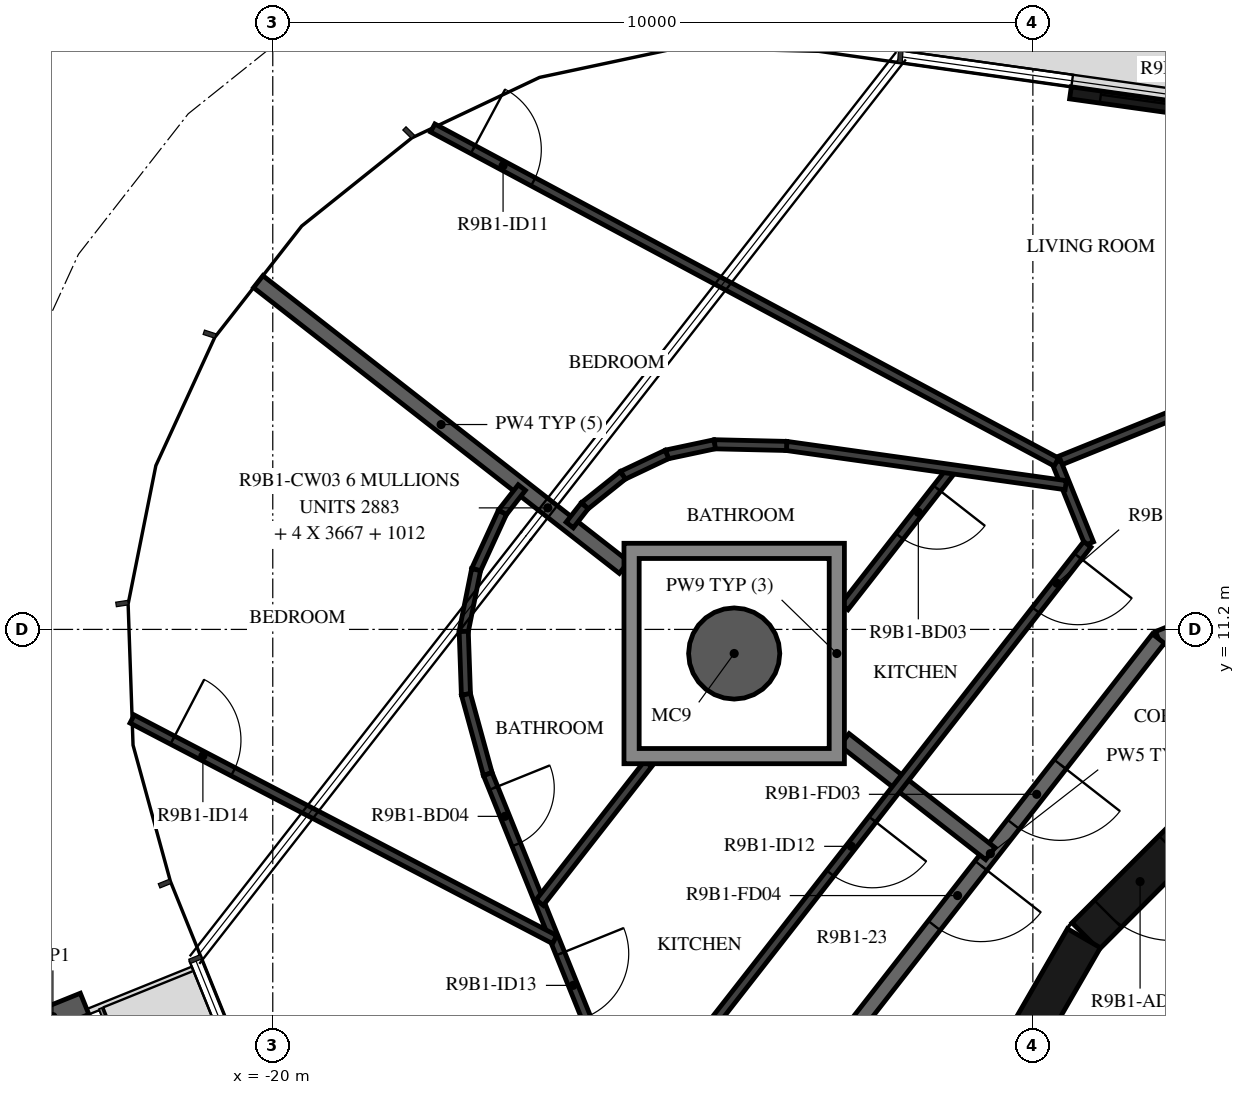
"""IFC4 building model, lengths in metres.
Left out: names, types, materials, properties, quantities, classifications, styles, units other than length and angle.
Written with IfcOpenShell. Run it as: python <this file> out.ifc"""

import sys

from ifc_helpers import new_model, si_unit, direction, frame, frame_2d, origin, origin_2d, place, context, subcontext, project, spatial, polyline, rectangle, hollow_circle, i_section, outline, extrude, element, fill, save


model = new_model("IFC4")
c1 = context("Model", 3, precision=1e-05, world=origin(), true_north=direction((0.0, 1.0)))
c2 = subcontext(c1, "Body", "Model", "MODEL_VIEW")
j1 = project(units=[si_unit("LENGTHUNIT", "METRE"), si_unit("PLANEANGLEUNIT", "RADIAN")], contexts=[c1])
p1 = place(None, origin())
s1 = spatial("IfcSite", under=j1, at=p1, CompositionType="ELEMENT")
p2 = place(p1, origin())
s2 = spatial("IfcBuilding", under=s1, at=p2, CompositionType="ELEMENT")
p3 = place(p2, frame((0.0, 0.0, 343.5)))
s3 = spatial("IfcBuildingStorey", under=s2, at=p3, CompositionType="ELEMENT", Elevation=343.5)
p4 = place(p3, frame((-13.929, 10.883, -0.38), z_axis=(0.0, 0.0, 1.0), x_axis=(1.0, 0.0, 0.0)))
e1 = element("IfcColumn", 1, at=p4, inside=s3, PredefinedType="COLUMN", context=c2, shape_type="SweptSolid", body=[
    extrude(hollow_circle(Radius=0.6, WallThickness=0.03, at=origin_2d()), origin(), (0.0, 0.0, 1.0), 3.5),
])
p5 = place(p3, frame((-22.893, 6.106, -0.38), z_axis=(0.0, 0.0, 1.0), x_axis=(-0.374606892434, 0.927183733755, 0.0)))
e2 = element("IfcColumn", 2, at=p5, inside=s3, PredefinedType="COLUMN", context=c2, shape_type="SweptSolid", body=[
    extrude(i_section(OverallWidth=0.3, OverallDepth=0.9, WebThickness=0.019, FlangeThickness=0.035, FilletRadius=0.03, at=origin_2d()), origin(), (0.0, 0.0, 1.0), 3.5),
])
p6 = place(p3, frame((-6.337, 17.814, 0.0), z_axis=(0.0, 0.0, 1.0), x_axis=(-0.99026890462, 0.13916715325, 0.0)))
e3 = element("IfcWall", 3, at=p6, inside=s3, PredefinedType="STANDARD", context=c2, shape_type="SweptSolid", body=[
    extrude(rectangle(XDim=3.2, YDim=0.16, at=frame_2d((1.6, 0.0))), origin(), (0.0, 0.0, 1.0), 3.12),
])
p7 = place(p6, frame((0.4, 0.0, 0.0)))
e4 = element("IfcOpeningElement", 4, at=p7, cuts=e3, PredefinedType="OPENING", context=c2, shape_type="SweptSolid", body=[
    extrude(rectangle(XDim=2.4, YDim=2.4, at=frame_2d((1.2, 1.2))), frame((0.0, 0.09, 0.0), z_axis=(0.0, -1.0, 0.0), x_axis=(1.0, 0.0, 0.0)), (0.0, 0.0, 1.0), 0.18),
])
p8 = place(p3, frame((-7.164, 9.308, 0.0), z_axis=(0.0, 0.0, 1.0), x_axis=(-0.707106781187, -0.707106781187, 0.0)))
e5 = element("IfcWall", 5, at=p8, inside=s3, PredefinedType="SHEAR", context=c2, shape_type="SweptSolid", body=[
    extrude(rectangle(XDim=3.032, YDim=0.5, at=frame_2d((1.516, 0.0))), origin(), (0.0, 0.0, 1.0), 3.12),
])
p9 = place(p8, frame((1.416, 0.0, 0.0)))
e6 = element("IfcOpeningElement", 6, at=p9, cuts=e5, PredefinedType="OPENING", context=c2, shape_type="SweptSolid", body=[
    extrude(rectangle(XDim=1.2, YDim=2.1, at=frame_2d((0.6, 1.05))), frame((0.0, 0.26, 0.0), z_axis=(0.0, -1.0, 0.0), x_axis=(1.0, 0.0, 0.0)), (0.0, 0.0, 1.0), 0.52),
])
p10 = place(p3, frame((-9.329, 7.137, 0.0), z_axis=(0.0, 0.0, 1.0), x_axis=(-0.500087131594, -0.865975092491, 0.0)))
e7 = element("IfcWall", 7, at=p10, inside=s3, PredefinedType="SHEAR", context=c2, shape_type="SweptSolid", body=[
    extrude(rectangle(XDim=3.033, YDim=0.5, at=frame_2d((1.516, 0.0))), origin(), (0.0, 0.0, 1.0), 3.12),
])
p11 = place(p3, frame((-1.691, 13.769, 0.0), z_axis=(0.0, 0.0, 1.0), x_axis=(-0.92717916932, -0.374618189599, 0.0)))
e8 = element("IfcWall", 8, at=p11, inside=s3, PredefinedType="STANDARD", context=c2, shape_type="SweptSolid", body=[
    extrude(rectangle(XDim=7.181, YDim=0.2, at=frame_2d((3.591, 0.0))), origin(), (0.0, 0.0, 1.0), 3.12),
])
p12 = place(p3, frame((-8.349, 11.079, 0.0), z_axis=(0.0, 0.0, 1.0), x_axis=(-0.615669112324, -0.78800478687, 0.0)))
e9 = element("IfcWall", 9, at=p12, inside=s3, PredefinedType="STANDARD", context=c2, shape_type="SweptSolid", body=[
    extrude(rectangle(XDim=7.181, YDim=0.2, at=frame_2d((3.591, 0.0))), origin(), (0.0, 0.0, 1.0), 3.12),
])
p13 = place(p12, frame((2.1, 0.0, 0.0)))
e10 = element("IfcOpeningElement", 10, at=p13, cuts=e9, PredefinedType="OPENING", context=c2, shape_type="SweptSolid", body=[
    extrude(rectangle(XDim=1.0, YDim=2.1, at=frame_2d((0.5, 1.05))), frame((0.0, 0.11, 0.0), z_axis=(0.0, -1.0, 0.0), x_axis=(1.0, 0.0, 0.0)), (0.0, 0.0, 1.0), 0.22),
])
p14 = place(p12, frame((3.79, 0.0, 0.0)))
e11 = element("IfcOpeningElement", 11, at=p14, cuts=e9, PredefinedType="OPENING", context=c2, shape_type="SweptSolid", body=[
    extrude(rectangle(XDim=1.0, YDim=2.1, at=frame_2d((0.5, 1.05))), frame((0.0, 0.11, 0.0), z_axis=(0.0, -1.0, 0.0), x_axis=(1.0, 0.0, 0.0)), (0.0, 0.0, 1.0), 0.22),
])
p15 = place(p3, frame((-12.479, 9.75, 0.0), z_axis=(0.0, 0.0, 1.0), x_axis=(0.788050197026, -0.615610986717, 0.0)))
e12 = element("IfcWall", 12, at=p15, inside=s3, PredefinedType="STANDARD", context=c2, shape_type="SweptSolid", body=[
    extrude(rectangle(XDim=2.437, YDim=0.2, at=frame_2d((1.218, 0.0))), origin(), (0.0, 0.0, 1.0), 3.12),
])
p16 = place(p3, frame((-20.191, 15.775, 0.0), z_axis=(0.0, 0.0, 1.0), x_axis=(0.788021948923, -0.615647145706, 0.0)))
e13 = element("IfcWall", 13, at=p16, inside=s3, PredefinedType="STANDARD", context=c2, shape_type="SweptSolid", body=[
    extrude(rectangle(XDim=6.106, YDim=0.2, at=frame_2d((3.053, 0.0))), origin(), (0.0, 0.0, 1.0), 3.12),
])
p17 = place(p3, frame((-8.115, 14.039, 0.0), z_axis=(0.0, 0.0, 1.0), x_axis=(-0.927153589835, -0.374681492546, 0.0)))
e14 = element("IfcWall", 14, at=p17, inside=s3, PredefinedType="PARTITIONING", context=c2, shape_type="SweptSolid", body=[
    extrude(rectangle(XDim=1.7, YDim=0.12, at=frame_2d((0.85, 0.0))), origin(), (0.0, 0.0, 1.0), 3.12),
])
p18 = place(p3, frame((-9.691, 13.402, 0.0), z_axis=(0.0, 0.0, 1.0), x_axis=(0.374484003097, -0.927233374844, 0.0)))
e15 = element("IfcWall", 15, at=p18, inside=s3, PredefinedType="PARTITIONING", context=c2, shape_type="SweptSolid", body=[
    extrude(rectangle(XDim=1.156, YDim=0.12, at=frame_2d((0.578, 0.0))), origin(), (0.0, 0.0, 1.0), 3.12),
])
p19 = place(p3, frame((-9.283, 12.319, 0.0), z_axis=(0.0, 0.0, 1.0), x_axis=(-0.61567489546, -0.788000268464, 0.0)))
e16 = element("IfcWall", 16, at=p19, inside=s3, PredefinedType="PARTITIONING", context=c2, shape_type="SweptSolid", body=[
    extrude(rectangle(XDim=7.985, YDim=0.12, at=frame_2d((3.992, 0.0))), origin(), (0.0, 0.0, 1.0), 3.12),
])
p20 = place(p19, frame((0.2, 0.0, 0.0)))
e17 = element("IfcOpeningElement", 17, at=p20, cuts=e16, PredefinedType="OPENING", context=c2, shape_type="SweptSolid", body=[
    extrude(rectangle(XDim=0.9, YDim=2.1, at=frame_2d((0.45, 1.05))), frame((0.0, 0.07, 0.0), z_axis=(0.0, -1.0, 0.0), x_axis=(1.0, 0.0, 0.0)), (0.0, 0.0, 1.0), 0.14),
])
p21 = place(p19, frame((4.592, 0.0, 0.0)))
e18 = element("IfcOpeningElement", 18, at=p21, cuts=e16, PredefinedType="OPENING", context=c2, shape_type="SweptSolid", body=[
    extrude(rectangle(XDim=0.9, YDim=2.1, at=frame_2d((0.45, 1.05))), frame((0.0, 0.07, 0.0), z_axis=(0.0, -1.0, 0.0), x_axis=(1.0, 0.0, 0.0)), (0.0, 0.0, 1.0), 0.14),
])
p22 = place(p3, frame((-17.896, 17.797, 0.0), z_axis=(0.0, 0.0, 1.0), x_axis=(0.88150492406, -0.4721748287, 0.0)))
e19 = element("IfcWall", 19, at=p22, inside=s3, PredefinedType="PARTITIONING", context=c2, shape_type="SweptSolid", body=[
    extrude(rectangle(XDim=9.308, YDim=0.12, at=frame_2d((4.654, 0.0))), origin(), (0.0, 0.0, 1.0), 3.12),
])
p23 = place(p22, frame((0.6, 0.0, 0.0)))
e20 = element("IfcOpeningElement", 20, at=p23, cuts=e19, PredefinedType="OPENING", context=c2, shape_type="SweptSolid", body=[
    extrude(rectangle(XDim=0.9, YDim=2.1, at=frame_2d((0.45, 1.05))), frame((0.0, 0.07, 0.0), z_axis=(0.0, -1.0, 0.0), x_axis=(1.0, 0.0, 0.0)), (0.0, 0.0, 1.0), 0.14),
])
p24 = place(p3, frame((-11.064, 13.308, 0.0), z_axis=(0.0, 0.0, 1.0), x_axis=(-0.615681126827, -0.787995399777, 0.0)))
e21 = element("IfcWall", 21, at=p24, inside=s3, PredefinedType="PARTITIONING", context=c2, shape_type="SweptSolid", body=[
    extrude(rectangle(XDim=2.3, YDim=0.12, at=frame_2d((1.15, 0.0))), origin(), (0.0, 0.0, 1.0), 3.12),
])
p25 = place(p24, frame((0.32, 0.0, 0.0)))
e22 = element("IfcOpeningElement", 22, at=p25, cuts=e21, PredefinedType="OPENING", context=c2, shape_type="SweptSolid", body=[
    extrude(rectangle(XDim=0.8, YDim=2.1, at=frame_2d((0.4, 1.05))), frame((0.0, 0.07, 0.0), z_axis=(0.0, -1.0, 0.0), x_axis=(1.0, 0.0, 0.0)), (0.0, 0.0, 1.0), 0.14),
])
p26 = place(p3, frame((-9.568, 13.097, 0.0), z_axis=(0.0, 0.0, 1.0), x_axis=(-0.990266931728, 0.13918119099, 0.0)))
e23 = element("IfcWall", 23, at=p26, inside=s3, PredefinedType="PARTITIONING", context=c2, shape_type="SweptSolid", body=[
    extrude(rectangle(XDim=3.708, YDim=0.12, at=frame_2d((1.854, 0.0))), origin(), (0.0, 0.0, 1.0), 3.12),
])
p27 = place(p3, frame((-13.24, 13.614, 0.0), z_axis=(0.0, 0.0, 1.0), x_axis=(-0.999730529074, 0.023213557177, 0.0)))
e24 = element("IfcWall", 24, at=p27, inside=s3, PredefinedType="PARTITIONING", context=c2, shape_type="SweptSolid", body=[
    extrude(rectangle(XDim=0.947, YDim=0.12, at=frame_2d((0.473, 0.0))), origin(), (0.0, 0.0, 1.0), 3.12),
])
p28 = place(p3, frame((-14.186, 13.635, 0.0), z_axis=(0.0, 0.0, 1.0), x_axis=(-0.978217752025, -0.207581380725, 0.0)))
e25 = element("IfcWall", 25, at=p28, inside=s3, PredefinedType="PARTITIONING", context=c2, shape_type="SweptSolid", body=[
    extrude(rectangle(XDim=0.642, YDim=0.12, at=frame_2d((0.321, 0.0))), origin(), (0.0, 0.0, 1.0), 3.12),
])
for number, where, z_axis, x_axis in (
    (26, (-14.814, 13.502, 0.0), (0.0, 0.0, 1.0), (-0.904, -0.428, 0.0)),
    (27, (-15.395, 13.227, 0.0), (0.0, 0.0, 1.0), (-0.781, -0.625, 0.0)),
):
    element("IfcWall", number, at=place(p3, frame(where, z_axis=z_axis, x_axis=x_axis)), inside=s3, PredefinedType="PARTITIONING", context=c2, shape_type="SweptSolid", body=[
        extrude(rectangle(XDim=0.642, YDim=0.12, at=frame_2d((0.321, 0.0))), origin(), (0.0, 0.0, 1.0), 3.12),
    ])
p29 = place(p3, frame((-15.896, 12.826, 0.0), z_axis=(0.0, 0.0, 1.0), x_axis=(-0.615466865985, -0.788162760396, 0.0)))
e28 = element("IfcWall", 28, at=p29, inside=s3, PredefinedType="PARTITIONING", context=c2, shape_type="SweptSolid", body=[
    extrude(rectangle(XDim=0.321, YDim=0.12, at=frame_2d((0.16, 0.0))), origin(), (0.0, 0.0, 1.0), 3.12),
])
p30 = place(p3, frame((-16.724, 13.066, 0.0), z_axis=(0.0, 0.0, 1.0), x_axis=(-0.615895388651, -0.787827944565, 0.0)))
e29 = element("IfcWall", 29, at=p30, inside=s3, PredefinedType="PARTITIONING", context=c2, shape_type="SweptSolid", body=[
    extrude(rectangle(XDim=0.415, YDim=0.12, at=frame_2d((0.207, 0.0))), origin(), (0.0, 0.0, 1.0), 3.12),
])
for number, where, z_axis, x_axis in (
    (30, (-16.979, 12.74, 0.0), (0.0, 0.0, 1.0), (-0.417, -0.909, 0.0)),
    (31, (-17.325, 11.986, 0.0), (0.0, 0.0, 1.0), (-0.197, -0.98, 0.0)),
    (32, (-17.488, 11.173, 0.0), (0.0, 0.0, 1.0), (0.035, -0.999, 0.0)),
):
    element("IfcWall", number, at=place(p3, frame(where, z_axis=z_axis, x_axis=x_axis)), inside=s3, PredefinedType="PARTITIONING", context=c2, shape_type="SweptSolid", body=[
        extrude(rectangle(XDim=0.829, YDim=0.12, at=frame_2d((0.415, 0.0))), origin(), (0.0, 0.0, 1.0), 3.12),
    ])
p31 = place(p3, frame((-17.459, 10.345, 0.0), z_axis=(0.0, 0.0, 1.0), x_axis=(0.264409755069, -0.964410432038, 0.0)))
e33 = element("IfcWall", 33, at=p31, inside=s3, PredefinedType="PARTITIONING", context=c2, shape_type="SweptSolid", body=[
    extrude(rectangle(XDim=1.087, YDim=0.12, at=frame_2d((0.543, 0.0))), origin(), (0.0, 0.0, 1.0), 3.12),
])
p32 = place(p3, frame((-17.171, 9.297, 0.0), z_axis=(0.0, 0.0, 1.0), x_axis=(0.374594127493, -0.927188891029, 0.0)))
e34 = element("IfcWall", 34, at=p32, inside=s3, PredefinedType="PARTITIONING", context=c2, shape_type="SweptSolid", body=[
    extrude(rectangle(XDim=5.174, YDim=0.12, at=frame_2d((2.587, 0.0))), origin(), (0.0, 0.0, 1.0), 3.12),
])
p33 = place(p32, frame((2.548, 0.0, 0.0)))
e35 = element("IfcOpeningElement", 35, at=p33, cuts=e34, PredefinedType="OPENING", context=c2, shape_type="SweptSolid", body=[
    extrude(rectangle(XDim=0.9, YDim=2.1, at=frame_2d((0.45, 1.05))), frame((0.0, 0.07, 0.0), z_axis=(0.0, -1.0, 0.0), x_axis=(1.0, 0.0, 0.0)), (0.0, 0.0, 1.0), 0.14),
])
p34 = place(p32, frame((0.2, 0.0, 0.0)))
e36 = element("IfcOpeningElement", 36, at=p34, cuts=e34, PredefinedType="OPENING", context=c2, shape_type="SweptSolid", body=[
    extrude(rectangle(XDim=0.8, YDim=2.1, at=frame_2d((0.4, 1.05))), frame((0.0, 0.07, 0.0), z_axis=(0.0, -1.0, 0.0), x_axis=(1.0, 0.0, 0.0)), (0.0, 0.0, 1.0), 0.14),
])
p35 = place(p3, frame((-16.488, 7.606, 0.0), z_axis=(0.0, 0.0, 1.0), x_axis=(0.615637911154, 0.788029163388, 0.0)))
e37 = element("IfcWall", 37, at=p35, inside=s3, PredefinedType="PARTITIONING", context=c2, shape_type="SweptSolid", body=[
    extrude(rectangle(XDim=2.318, YDim=0.12, at=frame_2d((1.159, 0.0))), origin(), (0.0, 0.0, 1.0), 3.12),
])
p36 = place(p3, frame((-21.85, 10.021, 0.0), z_axis=(0.0, 0.0, 1.0), x_axis=(0.886479988406, -0.462766928546, 0.0)))
e38 = element("IfcWall", 38, at=p36, inside=s3, PredefinedType="PARTITIONING", context=c2, shape_type="SweptSolid", body=[
    extrude(rectangle(XDim=6.27, YDim=0.12, at=frame_2d((3.135, 0.0))), origin(), (0.0, 0.0, 1.0), 3.12),
])
p37 = place(p36, frame((0.6, 0.0, 0.0)))
e39 = element("IfcOpeningElement", 39, at=p37, cuts=e38, PredefinedType="OPENING", context=c2, shape_type="SweptSolid", body=[
    extrude(rectangle(XDim=0.9, YDim=2.1, at=frame_2d((0.45, 1.05))), frame((0.0, 0.07, 0.0), z_axis=(0.0, -1.0, 0.0), x_axis=(1.0, 0.0, 0.0)), (0.0, 0.0, 1.0), 0.14),
])
p38 = place(p3, origin())
e40 = element("IfcWall", 40, at=p38, inside=s3, PredefinedType="STANDARD", context=c2, shape_type="SweptSolid", body=[
    extrude(outline(polyline([(-12.479, 12.333), (-12.479, 9.433), (-15.379, 9.433), (-15.379, 12.333), (-12.479, 12.333)]), holes=[polyline([(-15.179, 9.633), (-12.679, 9.633), (-12.679, 12.133), (-15.179, 12.133), (-15.179, 9.633)])]), origin(), (0.0, 0.0, 1.0), 3.12),
])
p39 = place(p7, origin())
e41 = element("IfcDoor", 41, at=p39, inside=s3, OperationType="DOUBLE_DOOR_SLIDING", PredefinedType="DOOR", context=c2, shape_type="SweptSolid", body=[
    extrude(rectangle(XDim=2.4, YDim=2.4, at=frame_2d((1.2, 1.2))), frame((0.0, 0.025, 0.0), z_axis=(0.0, -1.0, 0.0), x_axis=(1.0, 0.0, 0.0)), (0.0, 0.0, 1.0), 0.05),
])
fill(e4, e41)
p40 = place(p9, origin())
e42 = element("IfcDoor", 42, at=p40, inside=s3, OperationType="SINGLE_SWING_RIGHT", PredefinedType="DOOR", context=c2, shape_type="SweptSolid", body=[
    extrude(rectangle(XDim=1.2, YDim=2.1, at=frame_2d((0.6, 1.05))), frame((0.0, 0.025, 0.0), z_axis=(0.0, -1.0, 0.0), x_axis=(1.0, 0.0, 0.0)), (0.0, 0.0, 1.0), 0.05),
])
fill(e6, e42)
p41 = place(p13, origin())
e43 = element("IfcDoor", 43, at=p41, inside=s3, OperationType="SINGLE_SWING_RIGHT", PredefinedType="DOOR", context=c2, shape_type="SweptSolid", body=[
    extrude(rectangle(XDim=1.0, YDim=2.1, at=frame_2d((0.5, 1.05))), frame((0.0, 0.025, 0.0), z_axis=(0.0, -1.0, 0.0), x_axis=(1.0, 0.0, 0.0)), (0.0, 0.0, 1.0), 0.05),
])
fill(e10, e43)
p42 = place(p20, origin())
e44 = element("IfcDoor", 44, at=p42, inside=s3, OperationType="SINGLE_SWING_RIGHT", PredefinedType="DOOR", context=c2, shape_type="SweptSolid", body=[
    extrude(rectangle(XDim=0.9, YDim=2.1, at=frame_2d((0.45, 1.05))), frame((0.0, 0.025, 0.0), z_axis=(0.0, -1.0, 0.0), x_axis=(1.0, 0.0, 0.0)), (0.0, 0.0, 1.0), 0.05),
])
fill(e17, e44)
p43 = place(p25, origin())
e45 = element("IfcDoor", 45, at=p43, inside=s3, OperationType="SINGLE_SWING_RIGHT", PredefinedType="DOOR", context=c2, shape_type="SweptSolid", body=[
    extrude(rectangle(XDim=0.8, YDim=2.1, at=frame_2d((0.4, 1.05))), frame((0.0, 0.025, 0.0), z_axis=(0.0, -1.0, 0.0), x_axis=(1.0, 0.0, 0.0)), (0.0, 0.0, 1.0), 0.05),
])
fill(e22, e45)
p44 = place(p23, origin())
e46 = element("IfcDoor", 46, at=p44, inside=s3, OperationType="SINGLE_SWING_RIGHT", PredefinedType="DOOR", context=c2, shape_type="SweptSolid", body=[
    extrude(rectangle(XDim=0.9, YDim=2.1, at=frame_2d((0.45, 1.05))), frame((0.0, 0.025, 0.0), z_axis=(0.0, -1.0, 0.0), x_axis=(1.0, 0.0, 0.0)), (0.0, 0.0, 1.0), 0.05),
])
fill(e20, e46)
p45 = place(p14, origin())
e47 = element("IfcDoor", 47, at=p45, inside=s3, OperationType="SINGLE_SWING_LEFT", PredefinedType="DOOR", context=c2, shape_type="SweptSolid", body=[
    extrude(rectangle(XDim=1.0, YDim=2.1, at=frame_2d((0.5, 1.05))), frame((0.0, 0.025, 0.0), z_axis=(0.0, -1.0, 0.0), x_axis=(1.0, 0.0, 0.0)), (0.0, 0.0, 1.0), 0.05),
])
fill(e11, e47)
p46 = place(p21, origin())
e48 = element("IfcDoor", 48, at=p46, inside=s3, OperationType="SINGLE_SWING_LEFT", PredefinedType="DOOR", context=c2, shape_type="SweptSolid", body=[
    extrude(rectangle(XDim=0.9, YDim=2.1, at=frame_2d((0.45, 1.05))), frame((0.0, 0.025, 0.0), z_axis=(0.0, -1.0, 0.0), x_axis=(1.0, 0.0, 0.0)), (0.0, 0.0, 1.0), 0.05),
])
fill(e18, e48)
p47 = place(p33, origin())
e49 = element("IfcDoor", 49, at=p47, inside=s3, OperationType="SINGLE_SWING_LEFT", PredefinedType="DOOR", context=c2, shape_type="SweptSolid", body=[
    extrude(rectangle(XDim=0.9, YDim=2.1, at=frame_2d((0.45, 1.05))), frame((0.0, 0.025, 0.0), z_axis=(0.0, -1.0, 0.0), x_axis=(1.0, 0.0, 0.0)), (0.0, 0.0, 1.0), 0.05),
])
fill(e35, e49)
p48 = place(p37, origin())
e50 = element("IfcDoor", 50, at=p48, inside=s3, OperationType="SINGLE_SWING_LEFT", PredefinedType="DOOR", context=c2, shape_type="SweptSolid", body=[
    extrude(rectangle(XDim=0.9, YDim=2.1, at=frame_2d((0.45, 1.05))), frame((0.0, 0.025, 0.0), z_axis=(0.0, -1.0, 0.0), x_axis=(1.0, 0.0, 0.0)), (0.0, 0.0, 1.0), 0.05),
])
fill(e39, e50)
p49 = place(p34, origin())
e51 = element("IfcDoor", 51, at=p49, inside=s3, OperationType="SINGLE_SWING_RIGHT", PredefinedType="DOOR", context=c2, shape_type="SweptSolid", body=[
    extrude(rectangle(XDim=0.8, YDim=2.1, at=frame_2d((0.4, 1.05))), frame((0.0, 0.025, 0.0), z_axis=(0.0, -1.0, 0.0), x_axis=(1.0, 0.0, 0.0)), (0.0, 0.0, 1.0), 0.05),
])
fill(e36, e51)
save(model, sys.argv[1])
